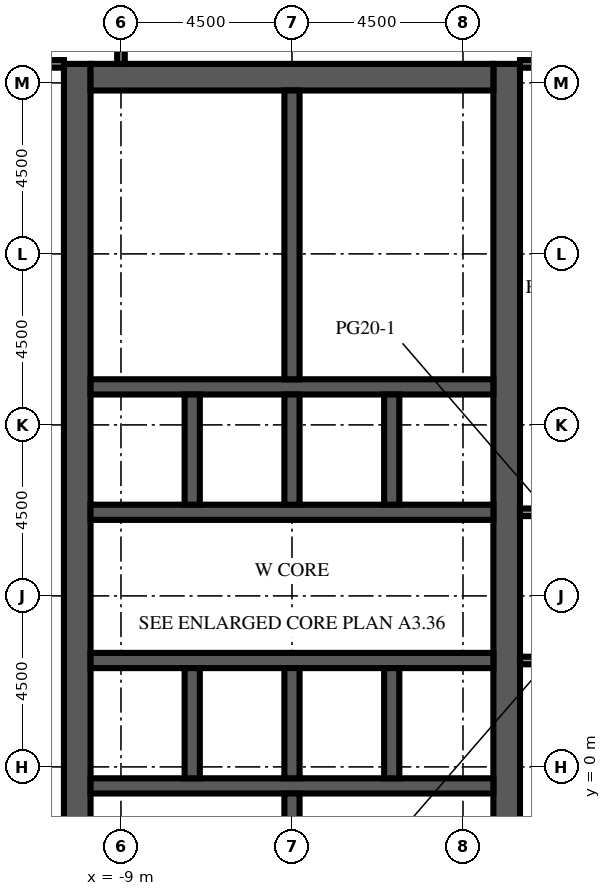
"""IFC4 building model, lengths in metres.
Left out: names, types, materials, properties, quantities, classifications, styles, units other than length and angle.
Written with IfcOpenShell. Run it as: python <this file> out.ifc"""

import sys

from ifc_helpers import new_model, si_unit, direction, frame, frame_2d, origin, place, context, subcontext, project, spatial, rectangle, extrude, element, fill, save


model = new_model("IFC4")
c1 = context("Model", 3, precision=1e-05, world=origin(), true_north=direction((0.0, 1.0)))
c2 = subcontext(c1, "Body", "Model", "MODEL_VIEW")
j1 = project(units=[si_unit("LENGTHUNIT", "METRE"), si_unit("PLANEANGLEUNIT", "RADIAN")], contexts=[c1])
p1 = place(None, origin())
s1 = spatial("IfcSite", under=j1, at=p1, CompositionType="ELEMENT")
p2 = place(p1, origin())
s2 = spatial("IfcBuilding", under=s1, at=p2, CompositionType="ELEMENT")
p3 = place(p2, frame((0.0, 0.0, 243.9)))
s3 = spatial("IfcBuildingStorey", under=s2, at=p3, CompositionType="ELEMENT", Elevation=243.9)
p4 = place(p3, frame((-10.15, -9.0, 0.0), z_axis=(0.0, 0.0, 1.0), x_axis=(0.0, 1.0, 0.0)))
e1 = element("IfcWall", 1, at=p4, inside=s3, PredefinedType="SHEAR", context=c2, shape_type="SweptSolid", body=[
    extrude(rectangle(XDim=27.5, YDim=0.7, at=frame_2d((13.75, 0.0))), origin(), (0.0, 0.0, 1.0), 4.1),
])
p5 = place(p4, frame((12.55, 0.0, 0.0)))
e2 = element("IfcOpeningElement", 2, at=p5, cuts=e1, PredefinedType="OPENING", context=c2, shape_type="SweptSolid", body=[
    extrude(rectangle(XDim=2.4, YDim=2.4, at=frame_2d((1.2, 1.2))), frame((0.0, 0.36, 0.0), z_axis=(0.0, -1.0, 0.0), x_axis=(1.0, 0.0, 0.0)), (0.0, 0.0, 1.0), 0.72),
])
p6 = place(p4, frame((6.825, 0.0, 0.0)))
e3 = element("IfcOpeningElement", 3, at=p6, cuts=e1, PredefinedType="OPENING", context=c2, shape_type="SweptSolid", body=[
    extrude(rectangle(XDim=1.2, YDim=2.1, at=frame_2d((0.6, 1.05))), frame((0.0, 0.36, 0.0), z_axis=(0.0, -1.0, 0.0), x_axis=(1.0, 0.0, 0.0)), (0.0, 0.0, 1.0), 0.72),
])
p7 = place(p4, frame((19.475, 0.0, 0.0)))
e4 = element("IfcOpeningElement", 4, at=p7, cuts=e1, PredefinedType="OPENING", context=c2, shape_type="SweptSolid", body=[
    extrude(rectangle(XDim=1.2, YDim=2.1, at=frame_2d((0.6, 1.05))), frame((0.0, 0.36, 0.0), z_axis=(0.0, -1.0, 0.0), x_axis=(1.0, 0.0, 0.0)), (0.0, 0.0, 1.0), 0.72),
])
p8 = place(p3, frame((1.15, -9.0, 0.0), z_axis=(0.0, 0.0, 1.0), x_axis=(0.0, 1.0, 0.0)))
e5 = element("IfcWall", 5, at=p8, inside=s3, PredefinedType="SHEAR", context=c2, shape_type="SweptSolid", body=[
    extrude(rectangle(XDim=27.5, YDim=0.7, at=frame_2d((13.75, 0.0))), origin(), (0.0, 0.0, 1.0), 4.1),
])
p9 = place(p8, frame((12.55, 0.0, 0.0)))
e6 = element("IfcOpeningElement", 6, at=p9, cuts=e5, PredefinedType="OPENING", context=c2, shape_type="SweptSolid", body=[
    extrude(rectangle(XDim=2.4, YDim=2.4, at=frame_2d((1.2, 1.2))), frame((0.0, 0.36, 0.0), z_axis=(0.0, -1.0, 0.0), x_axis=(1.0, 0.0, 0.0)), (0.0, 0.0, 1.0), 0.72),
])
p10 = place(p8, frame((3.9, 0.0, 0.0)))
e7 = element("IfcOpeningElement", 7, at=p10, cuts=e5, PredefinedType="OPENING", context=c2, shape_type="SweptSolid", body=[
    extrude(rectangle(XDim=1.2, YDim=2.1, at=frame_2d((0.6, 1.05))), frame((0.0, 0.36, 0.0), z_axis=(0.0, -1.0, 0.0), x_axis=(1.0, 0.0, 0.0)), (0.0, 0.0, 1.0), 0.72),
])
p11 = place(p8, frame((22.4, 0.0, 0.0)))
e8 = element("IfcOpeningElement", 8, at=p11, cuts=e5, PredefinedType="OPENING", context=c2, shape_type="SweptSolid", body=[
    extrude(rectangle(XDim=1.2, YDim=2.1, at=frame_2d((0.6, 1.05))), frame((0.0, 0.36, 0.0), z_axis=(0.0, -1.0, 0.0), x_axis=(1.0, 0.0, 0.0)), (0.0, 0.0, 1.0), 0.72),
])
p12 = place(p3, frame((-9.8, 18.15, 0.0), z_axis=(0.0, 0.0, 1.0), x_axis=(1.0, 0.0, 0.0)))
e9 = element("IfcWall", 9, at=p12, inside=s3, PredefinedType="SHEAR", context=c2, shape_type="SweptSolid", body=[
    extrude(rectangle(XDim=10.6, YDim=0.7, at=frame_2d((5.3, 0.0))), origin(), (0.0, 0.0, 1.0), 4.1),
])
p13 = place(p3, frame((-9.8, -0.5, 0.0), z_axis=(0.0, 0.0, 1.0), x_axis=(1.0, 0.0, 0.0)))
e10 = element("IfcWall", 10, at=p13, inside=s3, PredefinedType="SHEAR", context=c2, shape_type="SweptSolid", body=[
    extrude(rectangle(XDim=10.6, YDim=0.4, at=frame_2d((5.3, 0.0))), origin(), (0.0, 0.0, 1.0), 4.1),
])
p14 = place(p3, frame((-9.8, 2.8, 0.0), z_axis=(0.0, 0.0, 1.0), x_axis=(1.0, 0.0, 0.0)))
e11 = element("IfcWall", 11, at=p14, inside=s3, PredefinedType="SHEAR", context=c2, shape_type="SweptSolid", body=[
    extrude(rectangle(XDim=10.6, YDim=0.4, at=frame_2d((5.3, 0.0))), origin(), (0.0, 0.0, 1.0), 4.1),
])
p15 = place(p14, frame((0.688, 0.0, 0.0)))
e12 = element("IfcOpeningElement", 12, at=p15, cuts=e11, PredefinedType="OPENING", context=c2, shape_type="SweptSolid", body=[
    extrude(rectangle(XDim=1.1, YDim=2.1, at=frame_2d((0.55, 1.05))), frame((0.0, 0.21, 0.0), z_axis=(0.0, -1.0, 0.0), x_axis=(1.0, 0.0, 0.0)), (0.0, 0.0, 1.0), 0.42),
])
p16 = place(p14, frame((3.438, 0.0, 0.0)))
e13 = element("IfcOpeningElement", 13, at=p16, cuts=e11, PredefinedType="OPENING", context=c2, shape_type="SweptSolid", body=[
    extrude(rectangle(XDim=1.1, YDim=2.1, at=frame_2d((0.55, 1.05))), frame((0.0, 0.21, 0.0), z_axis=(0.0, -1.0, 0.0), x_axis=(1.0, 0.0, 0.0)), (0.0, 0.0, 1.0), 0.42),
])
p17 = place(p14, frame((6.113, 0.0, 0.0)))
e14 = element("IfcOpeningElement", 14, at=p17, cuts=e11, PredefinedType="OPENING", context=c2, shape_type="SweptSolid", body=[
    extrude(rectangle(XDim=1.0, YDim=2.1, at=frame_2d((0.5, 1.05))), frame((0.0, 0.21, 0.0), z_axis=(0.0, -1.0, 0.0), x_axis=(1.0, 0.0, 0.0)), (0.0, 0.0, 1.0), 0.42),
])
p18 = place(p14, frame((8.863, 0.0, 0.0)))
e15 = element("IfcOpeningElement", 15, at=p18, cuts=e11, PredefinedType="OPENING", context=c2, shape_type="SweptSolid", body=[
    extrude(rectangle(XDim=1.0, YDim=2.1, at=frame_2d((0.5, 1.05))), frame((0.0, 0.21, 0.0), z_axis=(0.0, -1.0, 0.0), x_axis=(1.0, 0.0, 0.0)), (0.0, 0.0, 1.0), 0.42),
])
p19 = place(p3, frame((-9.8, 6.7, 0.0), z_axis=(0.0, 0.0, 1.0), x_axis=(1.0, 0.0, 0.0)))
e16 = element("IfcWall", 16, at=p19, inside=s3, PredefinedType="SHEAR", context=c2, shape_type="SweptSolid", body=[
    extrude(rectangle(XDim=10.6, YDim=0.4, at=frame_2d((5.3, 0.0))), origin(), (0.0, 0.0, 1.0), 4.1),
])
p20 = place(p19, frame((3.438, 0.0, 0.0)))
e17 = element("IfcOpeningElement", 17, at=p20, cuts=e16, PredefinedType="OPENING", context=c2, shape_type="SweptSolid", body=[
    extrude(rectangle(XDim=1.1, YDim=2.1, at=frame_2d((0.55, 1.05))), frame((0.0, 0.21, 0.0), z_axis=(0.0, -1.0, 0.0), x_axis=(1.0, 0.0, 0.0)), (0.0, 0.0, 1.0), 0.42),
])
p21 = place(p19, frame((6.062, 0.0, 0.0)))
e18 = element("IfcOpeningElement", 18, at=p21, cuts=e16, PredefinedType="OPENING", context=c2, shape_type="SweptSolid", body=[
    extrude(rectangle(XDim=1.1, YDim=2.1, at=frame_2d((0.55, 1.05))), frame((0.0, 0.21, 0.0), z_axis=(0.0, -1.0, 0.0), x_axis=(1.0, 0.0, 0.0)), (0.0, 0.0, 1.0), 0.42),
])
p22 = place(p19, frame((8.812, 0.0, 0.0)))
e19 = element("IfcOpeningElement", 19, at=p22, cuts=e16, PredefinedType="OPENING", context=c2, shape_type="SweptSolid", body=[
    extrude(rectangle(XDim=1.1, YDim=2.1, at=frame_2d((0.55, 1.05))), frame((0.0, 0.21, 0.0), z_axis=(0.0, -1.0, 0.0), x_axis=(1.0, 0.0, 0.0)), (0.0, 0.0, 1.0), 0.42),
])
p23 = place(p19, frame((0.738, 0.0, 0.0)))
e20 = element("IfcOpeningElement", 20, at=p23, cuts=e16, PredefinedType="OPENING", context=c2, shape_type="SweptSolid", body=[
    extrude(rectangle(XDim=1.0, YDim=2.1, at=frame_2d((0.5, 1.05))), frame((0.0, 0.21, 0.0), z_axis=(0.0, -1.0, 0.0), x_axis=(1.0, 0.0, 0.0)), (0.0, 0.0, 1.0), 0.42),
])
p24 = place(p3, frame((-9.8, 10.0, 0.0), z_axis=(0.0, 0.0, 1.0), x_axis=(1.0, 0.0, 0.0)))
e21 = element("IfcWall", 21, at=p24, inside=s3, PredefinedType="SHEAR", context=c2, shape_type="SweptSolid", body=[
    extrude(rectangle(XDim=10.6, YDim=0.4, at=frame_2d((5.3, 0.0))), origin(), (0.0, 0.0, 1.0), 4.1),
])
for number, where, z_axis, x_axis in (
    (22, (-7.125, -0.3, 0.0), (0.0, 0.0, 1.0), (0.0, 1.0, 0.0)),
    (23, (-7.125, 6.9, 0.0), (0.0, 0.0, 1.0), (0.0, 1.0, 0.0)),
    (24, (-4.5, -0.3, 0.0), (0.0, 0.0, 1.0), (0.0, 1.0, 0.0)),
    (25, (-4.5, 6.9, 0.0), (0.0, 0.0, 1.0), (0.0, 1.0, 0.0)),
    (26, (-1.875, -0.3, 0.0), (0.0, 0.0, 1.0), (0.0, 1.0, 0.0)),
    (27, (-1.875, 6.9, 0.0), (0.0, 0.0, 1.0), (0.0, 1.0, 0.0)),
):
    element("IfcWall", number, at=place(p3, frame(where, z_axis=z_axis, x_axis=x_axis)), inside=s3, PredefinedType="SHEAR", context=c2, shape_type="SweptSolid", body=[
        extrude(rectangle(XDim=2.9, YDim=0.4, at=frame_2d((1.45, 0.0))), origin(), (0.0, 0.0, 1.0), 4.1),
    ])
for number, where, z_axis, x_axis in (
    (28, (-4.5, -8.3, 0.0), (0.0, 0.0, 1.0), (0.0, 1.0, 0.0)),
    (29, (-4.5, 10.2, 0.0), (0.0, 0.0, 1.0), (0.0, 1.0, 0.0)),
):
    element("IfcWall", number, at=place(p3, frame(where, z_axis=z_axis, x_axis=x_axis)), inside=s3, PredefinedType="SHEAR", context=c2, shape_type="SweptSolid", body=[
        extrude(rectangle(XDim=7.6, YDim=0.4, at=frame_2d((3.8, 0.0))), origin(), (0.0, 0.0, 1.0), 4.1),
    ])
p25 = place(p3, frame((-0.7, -3.588, 0.0), z_axis=(0.0, 0.0, 1.0), x_axis=(0.0, 1.0, 0.0)))
e30 = element("IfcWall", 30, at=p25, inside=s3, PredefinedType="PARTITIONING", context=c2, shape_type="SweptSolid", body=[
    extrude(rectangle(XDim=2.888, YDim=0.1, at=frame_2d((1.444, 0.0))), origin(), (0.0, 0.0, 1.0), 3.65),
])
p26 = place(p25, frame((0.944, 0.0, 0.0)))
e31 = element("IfcOpeningElement", 31, at=p26, cuts=e30, PredefinedType="OPENING", context=c2, shape_type="SweptSolid", body=[
    extrude(rectangle(XDim=1.0, YDim=2.1, at=frame_2d((0.5, 1.05))), frame((0.0, 0.06, 0.0), z_axis=(0.0, -1.0, 0.0), x_axis=(1.0, 0.0, 0.0)), (0.0, 0.0, 1.0), 0.12),
])
p27 = place(p3, frame((-0.6, 10.2, 0.0), z_axis=(0.0, 0.0, 1.0), x_axis=(0.0, 1.0, 0.0)))
e32 = element("IfcWall", 32, at=p27, inside=s3, PredefinedType="PARTITIONING", context=c2, shape_type="SweptSolid", body=[
    extrude(rectangle(XDim=2.28, YDim=0.1, at=frame_2d((1.14, 0.0))), origin(), (0.0, 0.0, 1.0), 3.65),
])
p28 = place(p27, frame((0.64, 0.0, 0.0)))
e33 = element("IfcOpeningElement", 33, at=p28, cuts=e32, PredefinedType="OPENING", context=c2, shape_type="SweptSolid", body=[
    extrude(rectangle(XDim=1.0, YDim=2.1, at=frame_2d((0.5, 1.05))), frame((0.0, 0.06, 0.0), z_axis=(0.0, -1.0, 0.0), x_axis=(1.0, 0.0, 0.0)), (0.0, 0.0, 1.0), 0.12),
])
p29 = place(p3, frame((-0.6, 12.48, 0.0), z_axis=(0.0, 0.0, 1.0), x_axis=(0.0, 1.0, 0.0)))
e34 = element("IfcWall", 34, at=p29, inside=s3, PredefinedType="PARTITIONING", context=c2, shape_type="SweptSolid", body=[
    extrude(rectangle(XDim=2.432, YDim=0.1, at=frame_2d((1.216, 0.0))), origin(), (0.0, 0.0, 1.0), 3.65),
])
p30 = place(p29, frame((0.716, 0.0, 0.0)))
e35 = element("IfcOpeningElement", 35, at=p30, cuts=e34, PredefinedType="OPENING", context=c2, shape_type="SweptSolid", body=[
    extrude(rectangle(XDim=1.0, YDim=2.1, at=frame_2d((0.5, 1.05))), frame((0.0, 0.06, 0.0), z_axis=(0.0, -1.0, 0.0), x_axis=(1.0, 0.0, 0.0)), (0.0, 0.0, 1.0), 0.12),
])
p31 = place(p3, frame((-0.6, 14.912, 0.0), z_axis=(0.0, 0.0, 1.0), x_axis=(0.0, 1.0, 0.0)))
e36 = element("IfcWall", 36, at=p31, inside=s3, PredefinedType="PARTITIONING", context=c2, shape_type="SweptSolid", body=[
    extrude(rectangle(XDim=2.888, YDim=0.1, at=frame_2d((1.444, 0.0))), origin(), (0.0, 0.0, 1.0), 3.65),
])
p32 = place(p31, frame((0.944, 0.0, 0.0)))
e37 = element("IfcOpeningElement", 37, at=p32, cuts=e36, PredefinedType="OPENING", context=c2, shape_type="SweptSolid", body=[
    extrude(rectangle(XDim=1.0, YDim=2.1, at=frame_2d((0.5, 1.05))), frame((0.0, 0.06, 0.0), z_axis=(0.0, -1.0, 0.0), x_axis=(1.0, 0.0, 0.0)), (0.0, 0.0, 1.0), 0.12),
])
for number, where, z_axis, x_axis in (
    (38, (-4.3, 12.48, 0.0), (0.0, 0.0, 1.0), (1.0, 0.0, 0.0)),
    (39, (-4.3, 14.912, 0.0), (0.0, 0.0, 1.0), (1.0, 0.0, 0.0)),
):
    element("IfcWall", number, at=place(p3, frame(where, z_axis=z_axis, x_axis=x_axis)), inside=s3, PredefinedType="PARTITIONING", context=c2, shape_type="SweptSolid", body=[
        extrude(rectangle(XDim=3.7, YDim=0.1, at=frame_2d((1.85, 0.0))), origin(), (0.0, 0.0, 1.0), 3.65),
    ])
p33 = place(p3, frame((-9.0, 18.5, 0.0), z_axis=(0.0, 0.0, 1.0), x_axis=(0.0, 1.0, 0.0)))
e40 = element("IfcWall", 40, at=p33, inside=s3, PredefinedType="PARTITIONING", context=c2, shape_type="SweptSolid", body=[
    extrude(rectangle(XDim=3.5, YDim=0.2, at=frame_2d((1.75, 0.0))), origin(), (0.0, 0.0, 1.0), 3.65),
])
for number, where, z_axis, x_axis in (
    (41, (1.5, 2.8, 0.0), (0.0, 0.0, 1.0), (1.0, 0.0, 0.0)),
    (42, (1.5, 6.7, 0.0), (0.0, 0.0, 1.0), (1.0, 0.0, 0.0)),
):
    element("IfcWall", number, at=place(p3, frame(where, z_axis=z_axis, x_axis=x_axis)), inside=s3, PredefinedType="PARTITIONING", context=c2, shape_type="SweptSolid", body=[
        extrude(rectangle(XDim=1.5, YDim=0.2, at=frame_2d((0.75, 0.0))), origin(), (0.0, 0.0, 1.0), 3.65),
    ])
p34 = place(p3, frame((-13.5, 18.5, 0.0), z_axis=(0.0, 0.0, 1.0), x_axis=(1.0, 0.0, 0.0)))
e43 = element("IfcWall", 43, at=p34, inside=s3, PredefinedType="PARTITIONING", context=c2, shape_type="SweptSolid", body=[
    extrude(rectangle(XDim=3.0, YDim=0.2, at=frame_2d((1.5, 0.0))), origin(), (0.0, 0.0, 1.0), 3.65),
])
p35 = place(p34, frame((0.85, 0.0, 0.0)))
e44 = element("IfcOpeningElement", 44, at=p35, cuts=e43, PredefinedType="OPENING", context=c2, shape_type="SweptSolid", body=[
    extrude(rectangle(XDim=1.0, YDim=2.1, at=frame_2d((0.5, 1.05))), frame((0.0, 0.11, 0.0), z_axis=(0.0, -1.0, 0.0), x_axis=(1.0, 0.0, 0.0)), (0.0, 0.0, 1.0), 0.22),
])
p36 = place(p3, frame((1.5, 18.5, 0.0), z_axis=(0.0, 0.0, 1.0), x_axis=(1.0, 0.0, 0.0)))
e45 = element("IfcWall", 45, at=p36, inside=s3, PredefinedType="PARTITIONING", context=c2, shape_type="SweptSolid", body=[
    extrude(rectangle(XDim=4.5, YDim=0.2, at=frame_2d((2.25, 0.0))), origin(), (0.0, 0.0, 1.0), 3.65),
])
p37 = place(p36, frame((1.6, 0.0, 0.0)))
e46 = element("IfcOpeningElement", 46, at=p37, cuts=e45, PredefinedType="OPENING", context=c2, shape_type="SweptSolid", body=[
    extrude(rectangle(XDim=1.0, YDim=2.1, at=frame_2d((0.5, 1.05))), frame((0.0, 0.11, 0.0), z_axis=(0.0, -1.0, 0.0), x_axis=(1.0, 0.0, 0.0)), (0.0, 0.0, 1.0), 0.22),
])
p38 = place(p36, frame((3.35, 0.0, 0.0)))
e47 = element("IfcOpeningElement", 47, at=p38, cuts=e45, PredefinedType="OPENING", context=c2, shape_type="SweptSolid", body=[
    extrude(rectangle(XDim=1.0, YDim=2.1, at=frame_2d((0.5, 1.05))), frame((0.0, 0.11, 0.0), z_axis=(0.0, -1.0, 0.0), x_axis=(1.0, 0.0, 0.0)), (0.0, 0.0, 1.0), 0.22),
])
p39 = place(p15, origin())
e48 = element("IfcDoor", 48, at=p39, inside=s3, OperationType="DOUBLE_DOOR_SLIDING", PredefinedType="DOOR", context=c2, shape_type="SweptSolid", body=[
    extrude(rectangle(XDim=1.1, YDim=2.1, at=frame_2d((0.55, 1.05))), frame((0.0, 0.025, 0.0), z_axis=(0.0, -1.0, 0.0), x_axis=(1.0, 0.0, 0.0)), (0.0, 0.0, 1.0), 0.05),
])
fill(e12, e48)
p40 = place(p16, origin())
e49 = element("IfcDoor", 49, at=p40, inside=s3, OperationType="DOUBLE_DOOR_SLIDING", PredefinedType="DOOR", context=c2, shape_type="SweptSolid", body=[
    extrude(rectangle(XDim=1.1, YDim=2.1, at=frame_2d((0.55, 1.05))), frame((0.0, 0.025, 0.0), z_axis=(0.0, -1.0, 0.0), x_axis=(1.0, 0.0, 0.0)), (0.0, 0.0, 1.0), 0.05),
])
fill(e13, e49)
p41 = place(p20, origin())
e50 = element("IfcDoor", 50, at=p41, inside=s3, OperationType="DOUBLE_DOOR_SLIDING", PredefinedType="DOOR", context=c2, shape_type="SweptSolid", body=[
    extrude(rectangle(XDim=1.1, YDim=2.1, at=frame_2d((0.55, 1.05))), frame((0.0, 0.025, 0.0), z_axis=(0.0, -1.0, 0.0), x_axis=(1.0, 0.0, 0.0)), (0.0, 0.0, 1.0), 0.05),
])
fill(e17, e50)
p42 = place(p21, origin())
e51 = element("IfcDoor", 51, at=p42, inside=s3, OperationType="DOUBLE_DOOR_SLIDING", PredefinedType="DOOR", context=c2, shape_type="SweptSolid", body=[
    extrude(rectangle(XDim=1.1, YDim=2.1, at=frame_2d((0.55, 1.05))), frame((0.0, 0.025, 0.0), z_axis=(0.0, -1.0, 0.0), x_axis=(1.0, 0.0, 0.0)), (0.0, 0.0, 1.0), 0.05),
])
fill(e18, e51)
p43 = place(p22, origin())
e52 = element("IfcDoor", 52, at=p43, inside=s3, OperationType="DOUBLE_DOOR_SLIDING", PredefinedType="DOOR", context=c2, shape_type="SweptSolid", body=[
    extrude(rectangle(XDim=1.1, YDim=2.1, at=frame_2d((0.55, 1.05))), frame((0.0, 0.025, 0.0), z_axis=(0.0, -1.0, 0.0), x_axis=(1.0, 0.0, 0.0)), (0.0, 0.0, 1.0), 0.05),
])
fill(e19, e52)
p44 = place(p5, origin())
e53 = element("IfcDoor", 53, at=p44, inside=s3, OperationType="DOUBLE_DOOR_DOUBLE_SWING", PredefinedType="DOOR", context=c2, shape_type="SweptSolid", body=[
    extrude(rectangle(XDim=2.4, YDim=2.4, at=frame_2d((1.2, 1.2))), frame((0.0, 0.025, 0.0), z_axis=(0.0, -1.0, 0.0), x_axis=(1.0, 0.0, 0.0)), (0.0, 0.0, 1.0), 0.05),
])
fill(e2, e53)
p45 = place(p9, origin())
e54 = element("IfcDoor", 54, at=p45, inside=s3, OperationType="DOUBLE_DOOR_DOUBLE_SWING", PredefinedType="DOOR", context=c2, shape_type="SweptSolid", body=[
    extrude(rectangle(XDim=2.4, YDim=2.4, at=frame_2d((1.2, 1.2))), frame((0.0, 0.025, 0.0), z_axis=(0.0, -1.0, 0.0), x_axis=(1.0, 0.0, 0.0)), (0.0, 0.0, 1.0), 0.05),
])
fill(e6, e54)
p46 = place(p6, origin())
e55 = element("IfcDoor", 55, at=p46, inside=s3, OperationType="SINGLE_SWING_LEFT", PredefinedType="DOOR", context=c2, shape_type="SweptSolid", body=[
    extrude(rectangle(XDim=1.2, YDim=2.1, at=frame_2d((0.6, 1.05))), frame((0.0, 0.025, 0.0), z_axis=(0.0, -1.0, 0.0), x_axis=(1.0, 0.0, 0.0)), (0.0, 0.0, 1.0), 0.05),
])
fill(e3, e55)
p47 = place(p7, origin())
e56 = element("IfcDoor", 56, at=p47, inside=s3, OperationType="SINGLE_SWING_LEFT", PredefinedType="DOOR", context=c2, shape_type="SweptSolid", body=[
    extrude(rectangle(XDim=1.2, YDim=2.1, at=frame_2d((0.6, 1.05))), frame((0.0, 0.025, 0.0), z_axis=(0.0, -1.0, 0.0), x_axis=(1.0, 0.0, 0.0)), (0.0, 0.0, 1.0), 0.05),
])
fill(e4, e56)
p48 = place(p17, origin())
e57 = element("IfcDoor", 57, at=p48, inside=s3, OperationType="SINGLE_SWING_LEFT", PredefinedType="DOOR", context=c2, shape_type="SweptSolid", body=[
    extrude(rectangle(XDim=1.0, YDim=2.1, at=frame_2d((0.5, 1.05))), frame((0.0, 0.025, 0.0), z_axis=(0.0, -1.0, 0.0), x_axis=(1.0, 0.0, 0.0)), (0.0, 0.0, 1.0), 0.05),
])
fill(e14, e57)
p49 = place(p18, origin())
e58 = element("IfcDoor", 58, at=p49, inside=s3, OperationType="SINGLE_SWING_RIGHT", PredefinedType="DOOR", context=c2, shape_type="SweptSolid", body=[
    extrude(rectangle(XDim=1.0, YDim=2.1, at=frame_2d((0.5, 1.05))), frame((0.0, 0.025, 0.0), z_axis=(0.0, -1.0, 0.0), x_axis=(1.0, 0.0, 0.0)), (0.0, 0.0, 1.0), 0.05),
])
fill(e15, e58)
p50 = place(p23, origin())
e59 = element("IfcDoor", 59, at=p50, inside=s3, OperationType="SINGLE_SWING_LEFT", PredefinedType="DOOR", context=c2, shape_type="SweptSolid", body=[
    extrude(rectangle(XDim=1.0, YDim=2.1, at=frame_2d((0.5, 1.05))), frame((0.0, 0.025, 0.0), z_axis=(0.0, -1.0, 0.0), x_axis=(1.0, 0.0, 0.0)), (0.0, 0.0, 1.0), 0.05),
])
fill(e20, e59)
p51 = place(p11, origin())
e60 = element("IfcDoor", 60, at=p51, inside=s3, OperationType="SINGLE_SWING_LEFT", PredefinedType="DOOR", context=c2, shape_type="SweptSolid", body=[
    extrude(rectangle(XDim=1.2, YDim=2.1, at=frame_2d((0.6, 1.05))), frame((0.0, 0.325, 0.0), z_axis=(0.0, -1.0, 0.0), x_axis=(1.0, 0.0, 0.0)), (0.0, 0.0, 1.0), 0.05),
])
fill(e8, e60)
p52 = place(p28, origin())
e61 = element("IfcDoor", 61, at=p52, inside=s3, OperationType="SINGLE_SWING_RIGHT", PredefinedType="DOOR", context=c2, shape_type="SweptSolid", body=[
    extrude(rectangle(XDim=1.0, YDim=2.1, at=frame_2d((0.5, 1.05))), frame((0.0, 0.025, 0.0), z_axis=(0.0, -1.0, 0.0), x_axis=(1.0, 0.0, 0.0)), (0.0, 0.0, 1.0), 0.05),
])
fill(e33, e61)
p53 = place(p30, origin())
e62 = element("IfcDoor", 62, at=p53, inside=s3, OperationType="SINGLE_SWING_LEFT", PredefinedType="DOOR", context=c2, shape_type="SweptSolid", body=[
    extrude(rectangle(XDim=1.0, YDim=2.1, at=frame_2d((0.5, 1.05))), frame((0.0, 0.025, 0.0), z_axis=(0.0, -1.0, 0.0), x_axis=(1.0, 0.0, 0.0)), (0.0, 0.0, 1.0), 0.05),
])
fill(e35, e62)
p54 = place(p32, origin())
e63 = element("IfcDoor", 63, at=p54, inside=s3, OperationType="SINGLE_SWING_RIGHT", PredefinedType="DOOR", context=c2, shape_type="SweptSolid", body=[
    extrude(rectangle(XDim=1.0, YDim=2.1, at=frame_2d((0.5, 1.05))), frame((0.0, 0.025, 0.0), z_axis=(0.0, -1.0, 0.0), x_axis=(1.0, 0.0, 0.0)), (0.0, 0.0, 1.0), 0.05),
])
fill(e37, e63)
save(model, sys.argv[1])
